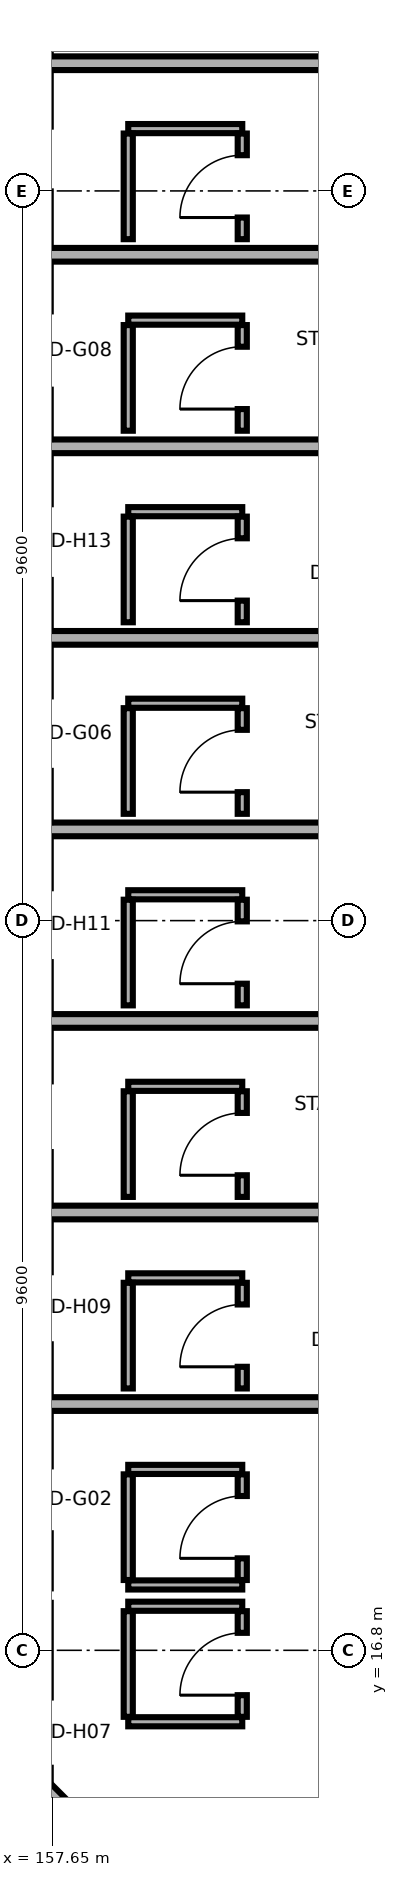
"""IFC4 building model, lengths in metres.
Left out: names, types, materials, properties, quantities, classifications, styles, units other than length and angle.
Written with IfcOpenShell. Run it as: python <this file> out.ifc"""

import sys

from ifc_helpers import new_model, si_unit, direction, frame, frame_2d, origin, place, context, subcontext, project, spatial, rectangle, extrude, element, fill, save


model = new_model("IFC4")
c1 = context("Model", 3, precision=1e-05, world=origin(), true_north=direction((0.0, 1.0)))
c2 = subcontext(c1, "Body", "Model", "MODEL_VIEW")
j1 = project(units=[si_unit("LENGTHUNIT", "METRE"), si_unit("PLANEANGLEUNIT", "RADIAN")], contexts=[c1])
p1 = place(None, origin())
s1 = spatial("IfcSite", under=j1, at=p1, CompositionType="ELEMENT")
p2 = place(p1, origin())
s2 = spatial("IfcBuilding", under=s1, at=p2, CompositionType="ELEMENT")
p3 = place(p2, frame((0.0, 0.0, 31.7)))
s3 = spatial("IfcBuildingStorey", under=s2, at=p3, CompositionType="ELEMENT", Elevation=31.7)
p4 = place(p3, frame((157.55, 15.0, 0.0), z_axis=(0.0, 0.0, 1.0), x_axis=(0.707106781187, -0.707106781187, 0.0)))
e1 = element("IfcWall", 1, at=p4, inside=s3, PredefinedType="PARTITIONING", context=c2, shape_type="SweptSolid", body=[
    extrude(rectangle(XDim=4.138, YDim=0.18, at=frame_2d((2.069, 0.0))), origin(), (0.0, 0.0, 1.0), 2.655),
])
for number, where, z_axis, x_axis in (
    (2, (158.65, 15.86, 0.0), (0.0, 0.0, 1.0), (1.0, 0.0, 0.0)),
    (3, (158.65, 17.38, 0.0), (0.0, 0.0, 1.0), (1.0, 0.0, 0.0)),
):
    element("IfcWall", number, at=place(p3, frame(where, z_axis=z_axis, x_axis=x_axis)), inside=s3, PredefinedType="PARTITIONING", context=c2, shape_type="SweptSolid", body=[
        extrude(rectangle(XDim=1.5, YDim=0.12, at=frame_2d((0.75, 0.0))), origin(), (0.0, 0.0, 1.0), 3.17),
    ])
p5 = place(p3, frame((158.65, 15.925, 0.0), z_axis=(0.0, 0.0, 1.0), x_axis=(0.0, 1.0, 0.0)))
e4 = element("IfcWall", 4, at=p5, inside=s3, PredefinedType="PARTITIONING", context=c2, shape_type="SweptSolid", body=[
    extrude(rectangle(XDim=1.39, YDim=0.12, at=frame_2d((0.695, 0.0))), origin(), (0.0, 0.0, 1.0), 2.755),
])
p6 = place(p3, frame((160.15, 15.925, 0.0), z_axis=(0.0, 0.0, 1.0), x_axis=(0.0, 1.0, 0.0)))
e5 = element("IfcWall", 5, at=p6, inside=s3, PredefinedType="PARTITIONING", context=c2, shape_type="SweptSolid", body=[
    extrude(rectangle(XDim=1.39, YDim=0.12, at=frame_2d((0.695, 0.0))), origin(), (0.0, 0.0, 1.0), 2.755),
])
p7 = place(p6, frame((0.285, 0.0, 0.0)))
e6 = element("IfcOpeningElement", 6, at=p7, cuts=e5, PredefinedType="OPENING", context=c2, shape_type="SweptSolid", body=[
    extrude(rectangle(XDim=0.82, YDim=2.08, at=frame_2d((0.41, 1.04))), frame((0.0, 0.07, 0.0), z_axis=(0.0, -1.0, 0.0), x_axis=(1.0, 0.0, 0.0)), (0.0, 0.0, 1.0), 0.14),
])
for number, where, z_axis, x_axis in (
    (7, (158.65, 17.66, 0.0), (0.0, 0.0, 1.0), (1.0, 0.0, 0.0)),
    (8, (158.65, 19.18, 0.0), (0.0, 0.0, 1.0), (1.0, 0.0, 0.0)),
):
    element("IfcWall", number, at=place(p3, frame(where, z_axis=z_axis, x_axis=x_axis)), inside=s3, PredefinedType="PARTITIONING", context=c2, shape_type="SweptSolid", body=[
        extrude(rectangle(XDim=1.5, YDim=0.12, at=frame_2d((0.75, 0.0))), origin(), (0.0, 0.0, 1.0), 3.17),
    ])
p8 = place(p3, frame((158.65, 17.725, 0.0), z_axis=(0.0, 0.0, 1.0), x_axis=(0.0, 1.0, 0.0)))
e9 = element("IfcWall", 9, at=p8, inside=s3, PredefinedType="PARTITIONING", context=c2, shape_type="SweptSolid", body=[
    extrude(rectangle(XDim=1.39, YDim=0.12, at=frame_2d((0.695, 0.0))), origin(), (0.0, 0.0, 1.0), 3.17),
])
p9 = place(p3, frame((160.15, 17.725, 0.0), z_axis=(0.0, 0.0, 1.0), x_axis=(0.0, 1.0, 0.0)))
e10 = element("IfcWall", 10, at=p9, inside=s3, PredefinedType="PARTITIONING", context=c2, shape_type="SweptSolid", body=[
    extrude(rectangle(XDim=1.39, YDim=0.12, at=frame_2d((0.695, 0.0))), origin(), (0.0, 0.0, 1.0), 3.17),
])
p10 = place(p9, frame((0.285, 0.0, 0.0)))
e11 = element("IfcOpeningElement", 11, at=p10, cuts=e10, PredefinedType="OPENING", context=c2, shape_type="SweptSolid", body=[
    extrude(rectangle(XDim=0.82, YDim=2.08, at=frame_2d((0.41, 1.04))), frame((0.0, 0.07, 0.0), z_axis=(0.0, -1.0, 0.0), x_axis=(1.0, 0.0, 0.0)), (0.0, 0.0, 1.0), 0.14),
])
p11 = place(p3, frame((157.55, 20.04, 0.0), z_axis=(0.0, 0.0, 1.0), x_axis=(1.0, 0.0, 0.0)))
e12 = element("IfcWall", 12, at=p11, inside=s3, PredefinedType="PARTITIONING", context=c2, shape_type="SweptSolid", body=[
    extrude(rectangle(XDim=7.568, YDim=0.18, at=frame_2d((3.784, 0.0))), origin(), (0.0, 0.0, 1.0), 2.655),
])
p12 = place(p3, frame((158.65, 21.7, 0.0), z_axis=(0.0, 0.0, 1.0), x_axis=(1.0, 0.0, 0.0)))
e13 = element("IfcWall", 13, at=p12, inside=s3, PredefinedType="PARTITIONING", context=c2, shape_type="SweptSolid", body=[
    extrude(rectangle(XDim=1.5, YDim=0.12, at=frame_2d((0.75, 0.0))), origin(), (0.0, 0.0, 1.0), 3.17),
])
p13 = place(p3, frame((158.65, 20.245, 0.0), z_axis=(0.0, 0.0, 1.0), x_axis=(0.0, 1.0, 0.0)))
e14 = element("IfcWall", 14, at=p13, inside=s3, PredefinedType="PARTITIONING", context=c2, shape_type="SweptSolid", body=[
    extrude(rectangle(XDim=1.39, YDim=0.12, at=frame_2d((0.695, 0.0))), origin(), (0.0, 0.0, 1.0), 3.17),
])
p14 = place(p3, frame((160.15, 20.245, 0.0), z_axis=(0.0, 0.0, 1.0), x_axis=(0.0, 1.0, 0.0)))
e15 = element("IfcWall", 15, at=p14, inside=s3, PredefinedType="PARTITIONING", context=c2, shape_type="SweptSolid", body=[
    extrude(rectangle(XDim=1.39, YDim=0.12, at=frame_2d((0.695, 0.0))), origin(), (0.0, 0.0, 1.0), 3.17),
])
p15 = place(p14, frame((0.285, 0.0, 0.0)))
e16 = element("IfcOpeningElement", 16, at=p15, cuts=e15, PredefinedType="OPENING", context=c2, shape_type="SweptSolid", body=[
    extrude(rectangle(XDim=0.82, YDim=2.08, at=frame_2d((0.41, 1.04))), frame((0.0, 0.07, 0.0), z_axis=(0.0, -1.0, 0.0), x_axis=(1.0, 0.0, 0.0)), (0.0, 0.0, 1.0), 0.14),
])
p16 = place(p3, frame((157.55, 22.56, 0.0), z_axis=(0.0, 0.0, 1.0), x_axis=(1.0, 0.0, 0.0)))
e17 = element("IfcWall", 17, at=p16, inside=s3, PredefinedType="PARTITIONING", context=c2, shape_type="SweptSolid", body=[
    extrude(rectangle(XDim=8.088, YDim=0.18, at=frame_2d((4.044, 0.0))), origin(), (0.0, 0.0, 1.0), 2.655),
])
p17 = place(p3, frame((158.65, 24.22, 0.0), z_axis=(0.0, 0.0, 1.0), x_axis=(1.0, 0.0, 0.0)))
e18 = element("IfcWall", 18, at=p17, inside=s3, PredefinedType="PARTITIONING", context=c2, shape_type="SweptSolid", body=[
    extrude(rectangle(XDim=1.5, YDim=0.12, at=frame_2d((0.75, 0.0))), origin(), (0.0, 0.0, 1.0), 2.755),
])
p18 = place(p3, frame((158.65, 22.765, 0.0), z_axis=(0.0, 0.0, 1.0), x_axis=(0.0, 1.0, 0.0)))
e19 = element("IfcWall", 19, at=p18, inside=s3, PredefinedType="PARTITIONING", context=c2, shape_type="SweptSolid", body=[
    extrude(rectangle(XDim=1.39, YDim=0.12, at=frame_2d((0.695, 0.0))), origin(), (0.0, 0.0, 1.0), 2.755),
])
p19 = place(p3, frame((160.15, 22.765, 0.0), z_axis=(0.0, 0.0, 1.0), x_axis=(0.0, 1.0, 0.0)))
e20 = element("IfcWall", 20, at=p19, inside=s3, PredefinedType="PARTITIONING", context=c2, shape_type="SweptSolid", body=[
    extrude(rectangle(XDim=1.39, YDim=0.12, at=frame_2d((0.695, 0.0))), origin(), (0.0, 0.0, 1.0), 2.755),
])
p20 = place(p19, frame((0.285, 0.0, 0.0)))
e21 = element("IfcOpeningElement", 21, at=p20, cuts=e20, PredefinedType="OPENING", context=c2, shape_type="SweptSolid", body=[
    extrude(rectangle(XDim=0.82, YDim=2.08, at=frame_2d((0.41, 1.04))), frame((0.0, 0.07, 0.0), z_axis=(0.0, -1.0, 0.0), x_axis=(1.0, 0.0, 0.0)), (0.0, 0.0, 1.0), 0.14),
])
p21 = place(p3, frame((157.55, 25.08, 0.0), z_axis=(0.0, 0.0, 1.0), x_axis=(1.0, 0.0, 0.0)))
e22 = element("IfcWall", 22, at=p21, inside=s3, PredefinedType="PARTITIONING", context=c2, shape_type="SweptSolid", body=[
    extrude(rectangle(XDim=8.315, YDim=0.18, at=frame_2d((4.157, 0.0))), origin(), (0.0, 0.0, 1.0), 2.655),
])
p22 = place(p3, frame((158.65, 26.74, 0.0), z_axis=(0.0, 0.0, 1.0), x_axis=(1.0, 0.0, 0.0)))
e23 = element("IfcWall", 23, at=p22, inside=s3, PredefinedType="PARTITIONING", context=c2, shape_type="SweptSolid", body=[
    extrude(rectangle(XDim=1.5, YDim=0.12, at=frame_2d((0.75, 0.0))), origin(), (0.0, 0.0, 1.0), 3.17),
])
p23 = place(p3, frame((158.65, 25.285, 0.0), z_axis=(0.0, 0.0, 1.0), x_axis=(0.0, 1.0, 0.0)))
e24 = element("IfcWall", 24, at=p23, inside=s3, PredefinedType="PARTITIONING", context=c2, shape_type="SweptSolid", body=[
    extrude(rectangle(XDim=1.39, YDim=0.12, at=frame_2d((0.695, 0.0))), origin(), (0.0, 0.0, 1.0), 3.17),
])
p24 = place(p3, frame((160.15, 25.285, 0.0), z_axis=(0.0, 0.0, 1.0), x_axis=(0.0, 1.0, 0.0)))
e25 = element("IfcWall", 25, at=p24, inside=s3, PredefinedType="PARTITIONING", context=c2, shape_type="SweptSolid", body=[
    extrude(rectangle(XDim=1.39, YDim=0.12, at=frame_2d((0.695, 0.0))), origin(), (0.0, 0.0, 1.0), 3.17),
])
p25 = place(p24, frame((0.285, 0.0, 0.0)))
e26 = element("IfcOpeningElement", 26, at=p25, cuts=e25, PredefinedType="OPENING", context=c2, shape_type="SweptSolid", body=[
    extrude(rectangle(XDim=0.82, YDim=2.08, at=frame_2d((0.41, 1.04))), frame((0.0, 0.07, 0.0), z_axis=(0.0, -1.0, 0.0), x_axis=(1.0, 0.0, 0.0)), (0.0, 0.0, 1.0), 0.14),
])
p26 = place(p3, frame((157.55, 27.6, 0.0), z_axis=(0.0, 0.0, 1.0), x_axis=(1.0, 0.0, 0.0)))
e27 = element("IfcWall", 27, at=p26, inside=s3, PredefinedType="PARTITIONING", context=c2, shape_type="SweptSolid", body=[
    extrude(rectangle(XDim=8.315, YDim=0.18, at=frame_2d((4.157, 0.0))), origin(), (0.0, 0.0, 1.0), 2.655),
])
p27 = place(p3, frame((158.65, 29.26, 0.0), z_axis=(0.0, 0.0, 1.0), x_axis=(1.0, 0.0, 0.0)))
e28 = element("IfcWall", 28, at=p27, inside=s3, PredefinedType="PARTITIONING", context=c2, shape_type="SweptSolid", body=[
    extrude(rectangle(XDim=1.5, YDim=0.12, at=frame_2d((0.75, 0.0))), origin(), (0.0, 0.0, 1.0), 3.17),
])
p28 = place(p3, frame((158.65, 27.805, 0.0), z_axis=(0.0, 0.0, 1.0), x_axis=(0.0, 1.0, 0.0)))
e29 = element("IfcWall", 29, at=p28, inside=s3, PredefinedType="PARTITIONING", context=c2, shape_type="SweptSolid", body=[
    extrude(rectangle(XDim=1.39, YDim=0.12, at=frame_2d((0.695, 0.0))), origin(), (0.0, 0.0, 1.0), 3.17),
])
p29 = place(p3, frame((160.15, 27.805, 0.0), z_axis=(0.0, 0.0, 1.0), x_axis=(0.0, 1.0, 0.0)))
e30 = element("IfcWall", 30, at=p29, inside=s3, PredefinedType="PARTITIONING", context=c2, shape_type="SweptSolid", body=[
    extrude(rectangle(XDim=1.39, YDim=0.12, at=frame_2d((0.695, 0.0))), origin(), (0.0, 0.0, 1.0), 3.17),
])
p30 = place(p29, frame((0.285, 0.0, 0.0)))
e31 = element("IfcOpeningElement", 31, at=p30, cuts=e30, PredefinedType="OPENING", context=c2, shape_type="SweptSolid", body=[
    extrude(rectangle(XDim=0.82, YDim=2.08, at=frame_2d((0.41, 1.04))), frame((0.0, 0.07, 0.0), z_axis=(0.0, -1.0, 0.0), x_axis=(1.0, 0.0, 0.0)), (0.0, 0.0, 1.0), 0.14),
])
p31 = place(p3, frame((157.55, 30.12, 0.0), z_axis=(0.0, 0.0, 1.0), x_axis=(1.0, 0.0, 0.0)))
e32 = element("IfcWall", 32, at=p31, inside=s3, PredefinedType="PARTITIONING", context=c2, shape_type="SweptSolid", body=[
    extrude(rectangle(XDim=8.315, YDim=0.18, at=frame_2d((4.157, 0.0))), origin(), (0.0, 0.0, 1.0), 2.655),
])
p32 = place(p3, frame((158.65, 31.78, 0.0), z_axis=(0.0, 0.0, 1.0), x_axis=(1.0, 0.0, 0.0)))
e33 = element("IfcWall", 33, at=p32, inside=s3, PredefinedType="PARTITIONING", context=c2, shape_type="SweptSolid", body=[
    extrude(rectangle(XDim=1.5, YDim=0.12, at=frame_2d((0.75, 0.0))), origin(), (0.0, 0.0, 1.0), 3.17),
])
p33 = place(p3, frame((158.65, 30.325, 0.0), z_axis=(0.0, 0.0, 1.0), x_axis=(0.0, 1.0, 0.0)))
e34 = element("IfcWall", 34, at=p33, inside=s3, PredefinedType="PARTITIONING", context=c2, shape_type="SweptSolid", body=[
    extrude(rectangle(XDim=1.39, YDim=0.12, at=frame_2d((0.695, 0.0))), origin(), (0.0, 0.0, 1.0), 2.755),
])
p34 = place(p3, frame((160.15, 30.325, 0.0), z_axis=(0.0, 0.0, 1.0), x_axis=(0.0, 1.0, 0.0)))
e35 = element("IfcWall", 35, at=p34, inside=s3, PredefinedType="PARTITIONING", context=c2, shape_type="SweptSolid", body=[
    extrude(rectangle(XDim=1.39, YDim=0.12, at=frame_2d((0.695, 0.0))), origin(), (0.0, 0.0, 1.0), 2.755),
])
p35 = place(p34, frame((0.285, 0.0, 0.0)))
e36 = element("IfcOpeningElement", 36, at=p35, cuts=e35, PredefinedType="OPENING", context=c2, shape_type="SweptSolid", body=[
    extrude(rectangle(XDim=0.82, YDim=2.08, at=frame_2d((0.41, 1.04))), frame((0.0, 0.07, 0.0), z_axis=(0.0, -1.0, 0.0), x_axis=(1.0, 0.0, 0.0)), (0.0, 0.0, 1.0), 0.14),
])
p36 = place(p3, frame((157.55, 32.64, 0.0), z_axis=(0.0, 0.0, 1.0), x_axis=(1.0, 0.0, 0.0)))
e37 = element("IfcWall", 37, at=p36, inside=s3, PredefinedType="PARTITIONING", context=c2, shape_type="SweptSolid", body=[
    extrude(rectangle(XDim=8.088, YDim=0.18, at=frame_2d((4.044, 0.0))), origin(), (0.0, 0.0, 1.0), 2.655),
])
p37 = place(p3, frame((158.65, 34.3, 0.0), z_axis=(0.0, 0.0, 1.0), x_axis=(1.0, 0.0, 0.0)))
e38 = element("IfcWall", 38, at=p37, inside=s3, PredefinedType="PARTITIONING", context=c2, shape_type="SweptSolid", body=[
    extrude(rectangle(XDim=1.5, YDim=0.12, at=frame_2d((0.75, 0.0))), origin(), (0.0, 0.0, 1.0), 3.17),
])
p38 = place(p3, frame((158.65, 32.845, 0.0), z_axis=(0.0, 0.0, 1.0), x_axis=(0.0, 1.0, 0.0)))
e39 = element("IfcWall", 39, at=p38, inside=s3, PredefinedType="PARTITIONING", context=c2, shape_type="SweptSolid", body=[
    extrude(rectangle(XDim=1.39, YDim=0.12, at=frame_2d((0.695, 0.0))), origin(), (0.0, 0.0, 1.0), 3.17),
])
p39 = place(p3, frame((160.15, 32.845, 0.0), z_axis=(0.0, 0.0, 1.0), x_axis=(0.0, 1.0, 0.0)))
e40 = element("IfcWall", 40, at=p39, inside=s3, PredefinedType="PARTITIONING", context=c2, shape_type="SweptSolid", body=[
    extrude(rectangle(XDim=1.39, YDim=0.12, at=frame_2d((0.695, 0.0))), origin(), (0.0, 0.0, 1.0), 3.17),
])
p40 = place(p39, frame((0.285, 0.0, 0.0)))
e41 = element("IfcOpeningElement", 41, at=p40, cuts=e40, PredefinedType="OPENING", context=c2, shape_type="SweptSolid", body=[
    extrude(rectangle(XDim=0.82, YDim=2.08, at=frame_2d((0.41, 1.04))), frame((0.0, 0.07, 0.0), z_axis=(0.0, -1.0, 0.0), x_axis=(1.0, 0.0, 0.0)), (0.0, 0.0, 1.0), 0.14),
])
p41 = place(p3, frame((157.55, 35.16, 0.0), z_axis=(0.0, 0.0, 1.0), x_axis=(1.0, 0.0, 0.0)))
e42 = element("IfcWall", 42, at=p41, inside=s3, PredefinedType="PARTITIONING", context=c2, shape_type="SweptSolid", body=[
    extrude(rectangle(XDim=7.568, YDim=0.18, at=frame_2d((3.784, 0.0))), origin(), (0.0, 0.0, 1.0), 2.655),
])
p42 = place(p3, frame((158.65, 36.82, 0.0), z_axis=(0.0, 0.0, 1.0), x_axis=(1.0, 0.0, 0.0)))
e43 = element("IfcWall", 43, at=p42, inside=s3, PredefinedType="PARTITIONING", context=c2, shape_type="SweptSolid", body=[
    extrude(rectangle(XDim=1.5, YDim=0.12, at=frame_2d((0.75, 0.0))), origin(), (0.0, 0.0, 1.0), 3.17),
])
p43 = place(p3, frame((158.65, 35.365, 0.0), z_axis=(0.0, 0.0, 1.0), x_axis=(0.0, 1.0, 0.0)))
e44 = element("IfcWall", 44, at=p43, inside=s3, PredefinedType="PARTITIONING", context=c2, shape_type="SweptSolid", body=[
    extrude(rectangle(XDim=1.39, YDim=0.12, at=frame_2d((0.695, 0.0))), origin(), (0.0, 0.0, 1.0), 3.17),
])
p44 = place(p3, frame((160.15, 35.365, 0.0), z_axis=(0.0, 0.0, 1.0), x_axis=(0.0, 1.0, 0.0)))
e45 = element("IfcWall", 45, at=p44, inside=s3, PredefinedType="PARTITIONING", context=c2, shape_type="SweptSolid", body=[
    extrude(rectangle(XDim=1.39, YDim=0.12, at=frame_2d((0.695, 0.0))), origin(), (0.0, 0.0, 1.0), 3.17),
])
p45 = place(p44, frame((0.285, 0.0, 0.0)))
e46 = element("IfcOpeningElement", 46, at=p45, cuts=e45, PredefinedType="OPENING", context=c2, shape_type="SweptSolid", body=[
    extrude(rectangle(XDim=0.82, YDim=2.08, at=frame_2d((0.41, 1.04))), frame((0.0, 0.07, 0.0), z_axis=(0.0, -1.0, 0.0), x_axis=(1.0, 0.0, 0.0)), (0.0, 0.0, 1.0), 0.14),
])
p46 = place(p3, frame((157.55, 37.68, 0.0), z_axis=(0.0, 0.0, 1.0), x_axis=(1.0, 0.0, 0.0)))
e47 = element("IfcWall", 47, at=p46, inside=s3, PredefinedType="PARTITIONING", context=c2, shape_type="SweptSolid", body=[
    extrude(rectangle(XDim=6.692, YDim=0.18, at=frame_2d((3.346, 0.0))), origin(), (0.0, 0.0, 1.0), 2.655),
])
p47 = place(p7, origin())
e48 = element("IfcDoor", 48, at=p47, inside=s3, OperationType="SINGLE_SWING_LEFT", PredefinedType="DOOR", context=c2, shape_type="SweptSolid", body=[
    extrude(rectangle(XDim=0.82, YDim=2.08, at=frame_2d((0.41, 1.04))), frame((0.0, 0.025, 0.0), z_axis=(0.0, -1.0, 0.0), x_axis=(1.0, 0.0, 0.0)), (0.0, 0.0, 1.0), 0.05),
])
fill(e6, e48)
p48 = place(p10, origin())
e49 = element("IfcDoor", 49, at=p48, inside=s3, OperationType="SINGLE_SWING_LEFT", PredefinedType="DOOR", context=c2, shape_type="SweptSolid", body=[
    extrude(rectangle(XDim=0.82, YDim=2.08, at=frame_2d((0.41, 1.04))), frame((0.0, 0.025, 0.0), z_axis=(0.0, -1.0, 0.0), x_axis=(1.0, 0.0, 0.0)), (0.0, 0.0, 1.0), 0.05),
])
fill(e11, e49)
p49 = place(p15, origin())
e50 = element("IfcDoor", 50, at=p49, inside=s3, OperationType="SINGLE_SWING_LEFT", PredefinedType="DOOR", context=c2, shape_type="SweptSolid", body=[
    extrude(rectangle(XDim=0.82, YDim=2.08, at=frame_2d((0.41, 1.04))), frame((0.0, 0.025, 0.0), z_axis=(0.0, -1.0, 0.0), x_axis=(1.0, 0.0, 0.0)), (0.0, 0.0, 1.0), 0.05),
])
fill(e16, e50)
p50 = place(p20, origin())
e51 = element("IfcDoor", 51, at=p50, inside=s3, OperationType="SINGLE_SWING_LEFT", PredefinedType="DOOR", context=c2, shape_type="SweptSolid", body=[
    extrude(rectangle(XDim=0.82, YDim=2.08, at=frame_2d((0.41, 1.04))), frame((0.0, 0.025, 0.0), z_axis=(0.0, -1.0, 0.0), x_axis=(1.0, 0.0, 0.0)), (0.0, 0.0, 1.0), 0.05),
])
fill(e21, e51)
p51 = place(p25, origin())
e52 = element("IfcDoor", 52, at=p51, inside=s3, OperationType="SINGLE_SWING_LEFT", PredefinedType="DOOR", context=c2, shape_type="SweptSolid", body=[
    extrude(rectangle(XDim=0.82, YDim=2.08, at=frame_2d((0.41, 1.04))), frame((0.0, 0.025, 0.0), z_axis=(0.0, -1.0, 0.0), x_axis=(1.0, 0.0, 0.0)), (0.0, 0.0, 1.0), 0.05),
])
fill(e26, e52)
p52 = place(p30, origin())
e53 = element("IfcDoor", 53, at=p52, inside=s3, OperationType="SINGLE_SWING_LEFT", PredefinedType="DOOR", context=c2, shape_type="SweptSolid", body=[
    extrude(rectangle(XDim=0.82, YDim=2.08, at=frame_2d((0.41, 1.04))), frame((0.0, 0.025, 0.0), z_axis=(0.0, -1.0, 0.0), x_axis=(1.0, 0.0, 0.0)), (0.0, 0.0, 1.0), 0.05),
])
fill(e31, e53)
p53 = place(p35, origin())
e54 = element("IfcDoor", 54, at=p53, inside=s3, OperationType="SINGLE_SWING_LEFT", PredefinedType="DOOR", context=c2, shape_type="SweptSolid", body=[
    extrude(rectangle(XDim=0.82, YDim=2.08, at=frame_2d((0.41, 1.04))), frame((0.0, 0.025, 0.0), z_axis=(0.0, -1.0, 0.0), x_axis=(1.0, 0.0, 0.0)), (0.0, 0.0, 1.0), 0.05),
])
fill(e36, e54)
p54 = place(p40, origin())
e55 = element("IfcDoor", 55, at=p54, inside=s3, OperationType="SINGLE_SWING_LEFT", PredefinedType="DOOR", context=c2, shape_type="SweptSolid", body=[
    extrude(rectangle(XDim=0.82, YDim=2.08, at=frame_2d((0.41, 1.04))), frame((0.0, 0.025, 0.0), z_axis=(0.0, -1.0, 0.0), x_axis=(1.0, 0.0, 0.0)), (0.0, 0.0, 1.0), 0.05),
])
fill(e41, e55)
p55 = place(p45, origin())
e56 = element("IfcDoor", 56, at=p55, inside=s3, OperationType="SINGLE_SWING_LEFT", PredefinedType="DOOR", context=c2, shape_type="SweptSolid", body=[
    extrude(rectangle(XDim=0.82, YDim=2.08, at=frame_2d((0.41, 1.04))), frame((0.0, 0.025, 0.0), z_axis=(0.0, -1.0, 0.0), x_axis=(1.0, 0.0, 0.0)), (0.0, 0.0, 1.0), 0.05),
])
fill(e46, e56)
save(model, sys.argv[1])
